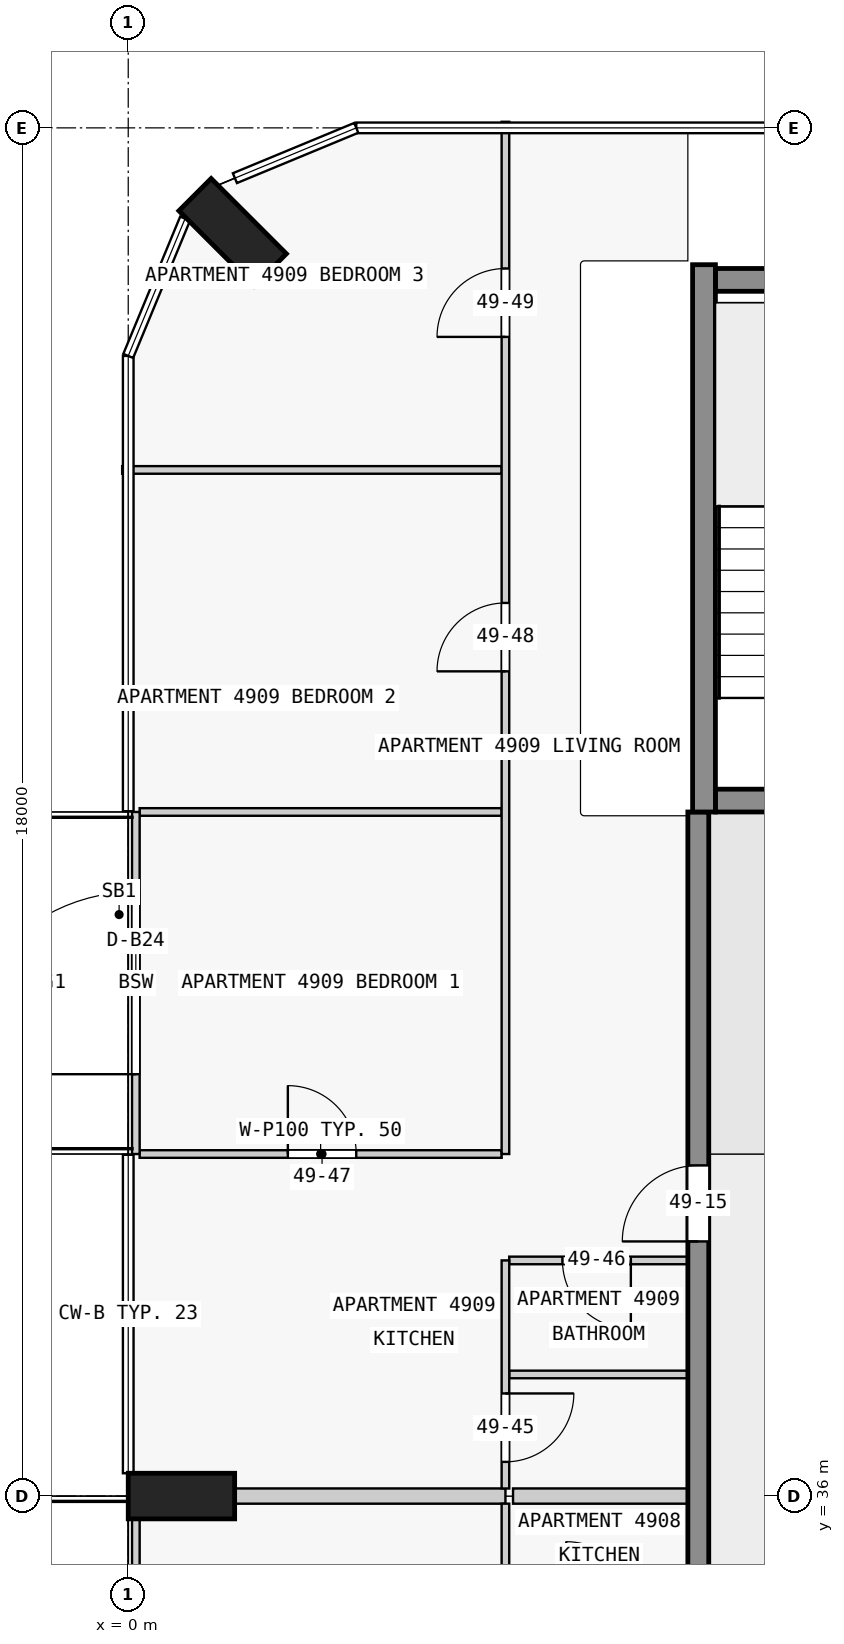
"""IFC4 building model, lengths in metres.
Left out: names, types, materials, properties, quantities, classifications, styles, units other than length and angle.
Written with IfcOpenShell. Run it as: python <this file> out.ifc"""

import sys

from ifc_helpers import new_model, si_unit, direction, frame, frame_2d, origin, origin_2d, place, context, subcontext, project, spatial, rectangle, extrude, element, fill, save


model = new_model("IFC4")
c1 = context("Model", 3, precision=1e-05, world=origin(), true_north=direction((0.0, 1.0)))
c2 = subcontext(c1, "Body", "Model", "MODEL_VIEW")
j1 = project(units=[si_unit("LENGTHUNIT", "METRE"), si_unit("PLANEANGLEUNIT", "RADIAN")], contexts=[c1])
p1 = place(None, origin())
s1 = spatial("IfcSite", under=j1, at=p1, CompositionType="ELEMENT")
p2 = place(p1, origin())
s2 = spatial("IfcBuilding", under=s1, at=p2, CompositionType="ELEMENT")
p3 = place(p2, frame((0.0, 0.0, 190.9)))
s3 = spatial("IfcBuildingStorey", under=s2, at=p3, CompositionType="ELEMENT", Elevation=190.9)
for number, where, z_axis, x_axis in (
    (1, (1.374, 52.626, 0.0), (0.0, 0.0, 1.0), (0.707, 0.707, 0.0)),
    (2, (0.7, 36.0, 0.0), (0.0, 0.0, 1.0), (0.0, 1.0, 0.0)),
):
    element("IfcColumn", number, at=place(p3, frame(where, z_axis=z_axis, x_axis=x_axis)), inside=s3, PredefinedType="COLUMN", context=c2, shape_type="SweptSolid", body=[
        extrude(rectangle(XDim=0.6, YDim=1.4, at=origin_2d()), origin(), (0.0, 0.0, 1.0), 3.5),
    ])
p4 = place(p3, frame((7.725, 45.15, 0.0), z_axis=(0.0, 0.0, 1.0), x_axis=(1.0, 0.0, 0.0)))
e3 = element("IfcWall", 3, at=p4, inside=s3, PredefinedType="SHEAR", context=c2, shape_type="SweptSolid", body=[
    extrude(rectangle(XDim=2.55, YDim=0.3, at=frame_2d((1.275, 0.0))), origin(), (0.0, 0.0, 1.0), 3.5),
])
p5 = place(p4, frame((0.725, 0.0, 0.0)))
e4 = element("IfcOpeningElement", 4, at=p5, cuts=e3, PredefinedType="OPENING", context=c2, shape_type="SweptSolid", body=[
    extrude(rectangle(XDim=1.1, YDim=2.1, at=frame_2d((0.55, 1.05))), frame((0.0, 0.16, 0.0), z_axis=(0.0, -1.0, 0.0), x_axis=(1.0, 0.0, 0.0)), (0.0, 0.0, 1.0), 0.32),
])
p6 = place(p3, frame((7.725, 52.0, 0.0), z_axis=(0.0, 0.0, 1.0), x_axis=(1.0, 0.0, 0.0)))
e5 = element("IfcWall", 5, at=p6, inside=s3, PredefinedType="SHEAR", context=c2, shape_type="SweptSolid", body=[
    extrude(rectangle(XDim=2.55, YDim=0.3, at=frame_2d((1.275, 0.0))), origin(), (0.0, 0.0, 1.0), 3.5),
])
p7 = place(p3, frame((7.575, 45.0, 0.0), z_axis=(0.0, 0.0, 1.0), x_axis=(0.0, 1.0, 0.0)))
e6 = element("IfcWall", 6, at=p7, inside=s3, PredefinedType="SHEAR", context=c2, shape_type="SweptSolid", body=[
    extrude(rectangle(XDim=7.2, YDim=0.3, at=frame_2d((3.6, 0.0))), origin(), (0.0, 0.0, 1.0), 3.5),
])
p8 = place(p3, frame((7.5, 18.0, 0.0), z_axis=(0.0, 0.0, 1.0), x_axis=(0.0, 1.0, 0.0)))
e7 = element("IfcWall", 7, at=p8, inside=s3, PredefinedType="SHEAR", context=c2, shape_type="SweptSolid", body=[
    extrude(rectangle(XDim=27.0, YDim=0.275, at=frame_2d((13.5, 0.0))), origin(), (0.0, 0.0, 1.0), 3.25),
])
p9 = place(p8, frame((1.75, 0.0, 0.0)))
e8 = element("IfcOpeningElement", 8, at=p9, cuts=e7, PredefinedType="OPENING", context=c2, shape_type="SweptSolid", body=[
    extrude(rectangle(XDim=1.0, YDim=2.1, at=frame_2d((0.5, 1.05))), frame((0.0, 0.147, 0.0), z_axis=(0.0, -1.0, 0.0), x_axis=(1.0, 0.0, 0.0)), (0.0, 0.0, 1.0), 0.295),
])
p10 = place(p8, frame((5.85, 0.0, 0.0)))
e9 = element("IfcOpeningElement", 9, at=p10, cuts=e7, PredefinedType="OPENING", context=c2, shape_type="SweptSolid", body=[
    extrude(rectangle(XDim=1.8, YDim=2.1, at=frame_2d((0.9, 1.05))), frame((0.0, 0.147, 0.0), z_axis=(0.0, -1.0, 0.0), x_axis=(1.0, 0.0, 0.0)), (0.0, 0.0, 1.0), 0.295),
])
p11 = place(p8, frame((10.75, 0.0, 0.0)))
e10 = element("IfcOpeningElement", 10, at=p11, cuts=e7, PredefinedType="OPENING", context=c2, shape_type="SweptSolid", body=[
    extrude(rectangle(XDim=1.0, YDim=2.1, at=frame_2d((0.5, 1.05))), frame((0.0, 0.147, 0.0), z_axis=(0.0, -1.0, 0.0), x_axis=(1.0, 0.0, 0.0)), (0.0, 0.0, 1.0), 0.295),
])
p12 = place(p8, frame((15.25, 0.0, 0.0)))
e11 = element("IfcOpeningElement", 11, at=p12, cuts=e7, PredefinedType="OPENING", context=c2, shape_type="SweptSolid", body=[
    extrude(rectangle(XDim=1.0, YDim=2.1, at=frame_2d((0.5, 1.05))), frame((0.0, 0.147, 0.0), z_axis=(0.0, -1.0, 0.0), x_axis=(1.0, 0.0, 0.0)), (0.0, 0.0, 1.0), 0.295),
])
p13 = place(p8, frame((21.35, 0.0, 0.0)))
e12 = element("IfcOpeningElement", 12, at=p13, cuts=e7, PredefinedType="OPENING", context=c2, shape_type="SweptSolid", body=[
    extrude(rectangle(XDim=1.0, YDim=2.1, at=frame_2d((0.5, 1.05))), frame((0.0, 0.147, 0.0), z_axis=(0.0, -1.0, 0.0), x_axis=(1.0, 0.0, 0.0)), (0.0, 0.0, 1.0), 0.295),
])
p14 = place(p3, frame((0.1, 31.5, 0.0), z_axis=(0.0, 0.0, 1.0), x_axis=(0.0, 1.0, 0.0)))
e13 = element("IfcWall", 13, at=p14, inside=s3, PredefinedType="STANDARD", context=c2, shape_type="SweptSolid", body=[
    extrude(rectangle(XDim=4.5, YDim=0.1, at=frame_2d((2.25, 0.0))), origin(), (0.0, 0.0, 1.0), 3.25),
])
p15 = place(p14, frame((1.05, 0.0, 0.0)))
e14 = element("IfcOpeningElement", 14, at=p15, cuts=e13, PredefinedType="OPENING", context=c2, shape_type="SweptSolid", body=[
    extrude(rectangle(XDim=2.4, YDim=2.4, at=frame_2d((1.2, 1.2))), frame((0.0, 0.06, 0.0), z_axis=(0.0, -1.0, 0.0), x_axis=(1.0, 0.0, 0.0)), (0.0, 0.0, 1.0), 0.12),
])
p16 = place(p3, frame((0.1, 40.5, 0.0), z_axis=(0.0, 0.0, 1.0), x_axis=(0.0, 1.0, 0.0)))
e15 = element("IfcWall", 15, at=p16, inside=s3, PredefinedType="STANDARD", context=c2, shape_type="SweptSolid", body=[
    extrude(rectangle(XDim=4.5, YDim=0.1, at=frame_2d((2.25, 0.0))), origin(), (0.0, 0.0, 1.0), 3.25),
])
p17 = place(p16, frame((1.05, 0.0, 0.0)))
e16 = element("IfcOpeningElement", 16, at=p17, cuts=e15, PredefinedType="OPENING", context=c2, shape_type="SweptSolid", body=[
    extrude(rectangle(XDim=2.4, YDim=2.4, at=frame_2d((1.2, 1.2))), frame((0.0, 0.06, 0.0), z_axis=(0.0, -1.0, 0.0), x_axis=(1.0, 0.0, 0.0)), (0.0, 0.0, 1.0), 0.12),
])
p18 = place(p3, frame((7.363, 36.0, 0.0), z_axis=(0.0, 0.0, 1.0), x_axis=(-1.0, 0.0, 0.0)))
e17 = element("IfcWall", 17, at=p18, inside=s3, PredefinedType="PARTITIONING", context=c2, shape_type="SweptSolid", body=[
    extrude(rectangle(XDim=2.3, YDim=0.2, at=frame_2d((1.15, 0.0))), origin(), (0.0, 0.0, 1.0), 3.25),
])
p19 = place(p3, frame((1.4, 36.0, 0.0), z_axis=(0.0, 0.0, 1.0), x_axis=(1.0, 0.0, 0.0)))
e18 = element("IfcWall", 18, at=p19, inside=s3, PredefinedType="PARTITIONING", context=c2, shape_type="SweptSolid", body=[
    extrude(rectangle(XDim=3.562, YDim=0.2, at=frame_2d((1.781, 0.0))), origin(), (0.0, 0.0, 1.0), 3.25),
])
p20 = place(p3, frame((7.363, 37.6, 0.0), z_axis=(0.0, 0.0, 1.0), x_axis=(-1.0, 0.0, 0.0)))
e19 = element("IfcWall", 19, at=p20, inside=s3, PredefinedType="PARTITIONING", context=c2, shape_type="SweptSolid", body=[
    extrude(rectangle(XDim=2.35, YDim=0.1, at=frame_2d((1.175, 0.0))), origin(), (0.0, 0.0, 1.0), 3.25),
])
p21 = place(p3, frame((7.363, 39.1, 0.0), z_axis=(0.0, 0.0, 1.0), x_axis=(-1.0, 0.0, 0.0)))
e20 = element("IfcWall", 20, at=p21, inside=s3, PredefinedType="PARTITIONING", context=c2, shape_type="SweptSolid", body=[
    extrude(rectangle(XDim=2.35, YDim=0.1, at=frame_2d((1.175, 0.0))), origin(), (0.0, 0.0, 1.0), 3.25),
])
p22 = place(p21, frame((0.75, 0.0, 0.0)))
e21 = element("IfcOpeningElement", 21, at=p22, cuts=e20, PredefinedType="OPENING", context=c2, shape_type="SweptSolid", body=[
    extrude(rectangle(XDim=0.9, YDim=2.1, at=frame_2d((0.45, 1.05))), frame((0.0, 0.06, 0.0), z_axis=(0.0, -1.0, 0.0), x_axis=(1.0, 0.0, 0.0)), (0.0, 0.0, 1.0), 0.12),
])
p23 = place(p3, frame((0.15, 40.5, 0.0), z_axis=(0.0, 0.0, 1.0), x_axis=(1.0, 0.0, 0.0)))
e22 = element("IfcWall", 22, at=p23, inside=s3, PredefinedType="PARTITIONING", context=c2, shape_type="SweptSolid", body=[
    extrude(rectangle(XDim=4.763, YDim=0.1, at=frame_2d((2.381, 0.0))), origin(), (0.0, 0.0, 1.0), 3.25),
])
p24 = place(p23, frame((1.95, 0.0, 0.0)))
e23 = element("IfcOpeningElement", 23, at=p24, cuts=e22, PredefinedType="OPENING", context=c2, shape_type="SweptSolid", body=[
    extrude(rectangle(XDim=0.9, YDim=2.1, at=frame_2d((0.45, 1.05))), frame((0.0, 0.06, 0.0), z_axis=(0.0, -1.0, 0.0), x_axis=(1.0, 0.0, 0.0)), (0.0, 0.0, 1.0), 0.12),
])
p25 = place(p3, frame((4.913, 45.0, 0.0), z_axis=(0.0, 0.0, 1.0), x_axis=(-1.0, 0.0, 0.0)))
e24 = element("IfcWall", 24, at=p25, inside=s3, PredefinedType="PARTITIONING", context=c2, shape_type="SweptSolid", body=[
    extrude(rectangle(XDim=4.763, YDim=0.1, at=frame_2d((2.381, 0.0))), origin(), (0.0, 0.0, 1.0), 3.25),
])
p26 = place(p3, frame((4.913, 49.5, 0.0), z_axis=(0.0, 0.0, 1.0), x_axis=(-1.0, 0.0, 0.0)))
e25 = element("IfcWall", 25, at=p26, inside=s3, PredefinedType="PARTITIONING", context=c2, shape_type="SweptSolid", body=[
    extrude(rectangle(XDim=4.993, YDim=0.1, at=frame_2d((2.496, 0.0))), origin(), (0.0, 0.0, 1.0), 3.25),
])
p27 = place(p3, frame((4.962, 35.9, 0.0), z_axis=(0.0, 0.0, 1.0), x_axis=(0.0, -1.0, 0.0)))
e26 = element("IfcWall", 26, at=p27, inside=s3, PredefinedType="PARTITIONING", context=c2, shape_type="SweptSolid", body=[
    extrude(rectangle(XDim=1.4, YDim=0.1, at=frame_2d((0.7, 0.0))), origin(), (0.0, 0.0, 1.0), 3.25),
])
p28 = place(p3, frame((4.962, 39.1, 0.0), z_axis=(0.0, 0.0, 1.0), x_axis=(0.0, -1.0, 0.0)))
e27 = element("IfcWall", 27, at=p28, inside=s3, PredefinedType="PARTITIONING", context=c2, shape_type="SweptSolid", body=[
    extrude(rectangle(XDim=3.0, YDim=0.1, at=frame_2d((1.5, 0.0))), origin(), (0.0, 0.0, 1.0), 3.25),
])
p29 = place(p28, frame((1.75, 0.0, 0.0)))
e28 = element("IfcOpeningElement", 28, at=p29, cuts=e27, PredefinedType="OPENING", context=c2, shape_type="SweptSolid", body=[
    extrude(rectangle(XDim=0.9, YDim=2.1, at=frame_2d((0.45, 1.05))), frame((0.0, 0.06, 0.0), z_axis=(0.0, -1.0, 0.0), x_axis=(1.0, 0.0, 0.0)), (0.0, 0.0, 1.0), 0.12),
])
p30 = place(p3, frame((4.962, 40.5, 0.0), z_axis=(0.0, 0.0, 1.0), x_axis=(0.0, 1.0, 0.0)))
e29 = element("IfcWall", 29, at=p30, inside=s3, PredefinedType="PARTITIONING", context=c2, shape_type="SweptSolid", body=[
    extrude(rectangle(XDim=13.58, YDim=0.1, at=frame_2d((6.79, 0.0))), origin(), (0.0, 0.0, 1.0), 3.25),
])
p31 = place(p30, frame((6.35, 0.0, 0.0)))
e30 = element("IfcOpeningElement", 30, at=p31, cuts=e29, PredefinedType="OPENING", context=c2, shape_type="SweptSolid", body=[
    extrude(rectangle(XDim=0.9, YDim=2.1, at=frame_2d((0.45, 1.05))), frame((0.0, 0.06, 0.0), z_axis=(0.0, -1.0, 0.0), x_axis=(1.0, 0.0, 0.0)), (0.0, 0.0, 1.0), 0.12),
])
p32 = place(p30, frame((10.75, 0.0, 0.0)))
e31 = element("IfcOpeningElement", 31, at=p32, cuts=e29, PredefinedType="OPENING", context=c2, shape_type="SweptSolid", body=[
    extrude(rectangle(XDim=0.9, YDim=2.1, at=frame_2d((0.45, 1.05))), frame((0.0, 0.06, 0.0), z_axis=(0.0, -1.0, 0.0), x_axis=(1.0, 0.0, 0.0)), (0.0, 0.0, 1.0), 0.12),
])
p33 = place(p17, origin())
e32 = element("IfcDoor", 32, at=p33, inside=s3, OperationType="SINGLE_SWING_LEFT", PredefinedType="DOOR", context=c2, shape_type="SweptSolid", body=[
    extrude(rectangle(XDim=2.4, YDim=2.4, at=frame_2d((1.2, 1.2))), frame((0.0, 0.025, 0.0), z_axis=(0.0, -1.0, 0.0), x_axis=(1.0, 0.0, 0.0)), (0.0, 0.0, 1.0), 0.05),
])
fill(e16, e32)
p34 = place(p13, origin())
e33 = element("IfcDoor", 33, at=p34, inside=s3, OperationType="SINGLE_SWING_RIGHT", PredefinedType="DOOR", context=c2, shape_type="SweptSolid", body=[
    extrude(rectangle(XDim=1.0, YDim=2.1, at=frame_2d((0.5, 1.05))), frame((0.0, 0.025, 0.0), z_axis=(0.0, -1.0, 0.0), x_axis=(1.0, 0.0, 0.0)), (0.0, 0.0, 1.0), 0.05),
])
fill(e12, e33)
p35 = place(p29, origin())
e34 = element("IfcDoor", 34, at=p35, inside=s3, OperationType="SINGLE_SWING_RIGHT", PredefinedType="DOOR", context=c2, shape_type="SweptSolid", body=[
    extrude(rectangle(XDim=0.9, YDim=2.1, at=frame_2d((0.45, 1.05))), frame((0.0, 0.025, 0.0), z_axis=(0.0, -1.0, 0.0), x_axis=(1.0, 0.0, 0.0)), (0.0, 0.0, 1.0), 0.05),
])
fill(e28, e34)
p36 = place(p22, origin())
e35 = element("IfcDoor", 35, at=p36, inside=s3, OperationType="SINGLE_SWING_RIGHT", PredefinedType="DOOR", context=c2, shape_type="SweptSolid", body=[
    extrude(rectangle(XDim=0.9, YDim=2.1, at=frame_2d((0.45, 1.05))), frame((0.0, 0.025, 0.0), z_axis=(0.0, -1.0, 0.0), x_axis=(1.0, 0.0, 0.0)), (0.0, 0.0, 1.0), 0.05),
])
fill(e21, e35)
p37 = place(p24, origin())
e36 = element("IfcDoor", 36, at=p37, inside=s3, OperationType="SINGLE_SWING_RIGHT", PredefinedType="DOOR", context=c2, shape_type="SweptSolid", body=[
    extrude(rectangle(XDim=0.9, YDim=2.1, at=frame_2d((0.45, 1.05))), frame((0.0, 0.025, 0.0), z_axis=(0.0, -1.0, 0.0), x_axis=(1.0, 0.0, 0.0)), (0.0, 0.0, 1.0), 0.05),
])
fill(e23, e36)
p38 = place(p31, origin())
e37 = element("IfcDoor", 37, at=p38, inside=s3, OperationType="SINGLE_SWING_RIGHT", PredefinedType="DOOR", context=c2, shape_type="SweptSolid", body=[
    extrude(rectangle(XDim=0.9, YDim=2.1, at=frame_2d((0.45, 1.05))), frame((0.0, 0.025, 0.0), z_axis=(0.0, -1.0, 0.0), x_axis=(1.0, 0.0, 0.0)), (0.0, 0.0, 1.0), 0.05),
])
fill(e30, e37)
p39 = place(p32, origin())
e38 = element("IfcDoor", 38, at=p39, inside=s3, OperationType="SINGLE_SWING_RIGHT", PredefinedType="DOOR", context=c2, shape_type="SweptSolid", body=[
    extrude(rectangle(XDim=0.9, YDim=2.1, at=frame_2d((0.45, 1.05))), frame((0.0, 0.025, 0.0), z_axis=(0.0, -1.0, 0.0), x_axis=(1.0, 0.0, 0.0)), (0.0, 0.0, 1.0), 0.05),
])
fill(e31, e38)
save(model, sys.argv[1])
